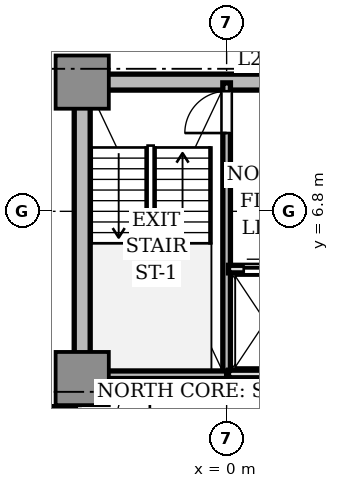
"""IFC4 building model, lengths in metres.
Left out: names, types, materials, properties, quantities, classifications, styles, units other than length and angle.
Written with IfcOpenShell. Run it as: python <this file> out.ifc"""

import sys

from ifc_helpers import new_model, si_unit, direction, frame, frame_2d, origin, origin_2d, place, context, subcontext, project, spatial, rectangle, extrude, source, transform, mapped, element, fill, save


model = new_model("IFC4")
c1 = context("Model", 3, precision=1e-05, world=origin(), true_north=direction((0.0, 1.0)))
c2 = subcontext(c1, "Body", "Model", "MODEL_VIEW")
j1 = project(units=[si_unit("LENGTHUNIT", "METRE"), si_unit("PLANEANGLEUNIT", "RADIAN")], contexts=[c1])
p1 = place(None, origin())
s1 = spatial("IfcSite", under=j1, at=p1, CompositionType="ELEMENT")
p2 = place(p1, origin())
s2 = spatial("IfcBuilding", under=s1, at=p2, CompositionType="ELEMENT")
p3 = place(p2, frame((0.0, 0.0, 93.55)))
s3 = spatial("IfcBuildingStorey", under=s2, at=p3, CompositionType="ELEMENT", Elevation=93.55)
p4 = place(p3, frame((-3.55, 10.2, 0.0), z_axis=(0.0, 0.0, 1.0), x_axis=(1.0, 0.0, 0.0)))
e1 = element("IfcWall", 1, at=p4, inside=s3, PredefinedType="SHEAR", context=c2, shape_type="SweptSolid", body=[
    extrude(rectangle(XDim=7.1, YDim=0.42, at=frame_2d((3.55, 0.0))), origin(), (0.0, 0.0, 1.0), 3.11),
])
p5 = place(p3, frame((-3.8, 2.85, 0.0), z_axis=(0.0, 0.0, 1.0), x_axis=(0.0, 1.0, 0.0)))
e2 = element("IfcWall", 2, at=p5, inside=s3, PredefinedType="SHEAR", context=c2, shape_type="SweptSolid", body=[
    extrude(rectangle(XDim=6.9, YDim=0.42, at=frame_2d((3.45, 0.0))), origin(), (0.0, 0.0, 1.0), 3.11),
])
m1 = source(origin(), c2, "Body", "SweptSolid", [
    extrude(rectangle(XDim=1.4, YDim=1.4, at=origin_2d()), origin(), (0.0, 0.0, 1.0), 3.11),
])
for number, where, z_axis, x_axis in (
    (3, (-3.8, 2.4, 0.0), (0.0, 0.0, 1.0), (1.0, 0.0, 0.0)),
    (4, (-3.8, 10.2, 0.0), (0.0, 0.0, 1.0), (1.0, 0.0, 0.0)),
):
    element("IfcColumn", number, at=place(p3, frame(where, z_axis=z_axis, x_axis=x_axis)), inside=s3, PredefinedType="COLUMN", context=c2, shape_type="MappedRepresentation", body=[
        mapped(m1, transform((0.0, 0.0, 0.0), scale=1.0)),
    ])
p6 = place(p3, frame((0.0, 2.5, 0.0), z_axis=(0.0, 0.0, 1.0), x_axis=(0.0, 1.0, 0.0)))
e5 = element("IfcWall", 5, at=p6, inside=s3, PredefinedType="SOLIDWALL", context=c2, shape_type="SweptSolid", body=[
    extrude(rectangle(XDim=7.68, YDim=0.2, at=frame_2d((3.84, 0.0))), origin(), (0.0, 0.0, 1.0), 3.11),
])
p7 = place(p6, frame((6.36, 0.0, 0.0)))
e6 = element("IfcOpeningElement", 6, at=p7, cuts=e5, PredefinedType="OPENING", context=c2, shape_type="SweptSolid", body=[
    extrude(rectangle(XDim=1.1, YDim=2.15, at=frame_2d((0.55, 1.075))), frame((0.0, 0.11, 0.0), z_axis=(0.0, -1.0, 0.0), x_axis=(1.0, 0.0, 0.0)), (0.0, 0.0, 1.0), 0.22),
])
p8 = place(p3, frame((-3.72, 2.5, 0.0), z_axis=(0.0, 0.0, 1.0), x_axis=(1.0, 0.0, 0.0)))
e7 = element("IfcWall", 7, at=p8, inside=s3, PredefinedType="SOLIDWALL", context=c2, shape_type="SweptSolid", body=[
    extrude(rectangle(XDim=3.72, YDim=0.2, at=frame_2d((1.86, 0.0))), origin(), (0.0, 0.0, 1.0), 3.11),
])
p9 = place(p3, frame((0.05, 2.52, 0.0), z_axis=(0.0, 0.0, 1.0), x_axis=(1.0, 0.0, 0.0)))
e8 = element("IfcWall", 8, at=p9, inside=s3, PredefinedType="SOLIDWALL", context=c2, shape_type="SweptSolid", body=[
    extrude(rectangle(XDim=1.95, YDim=0.2, at=frame_2d((0.975, 0.0))), origin(), (0.0, 0.0, 1.0), 2.66),
])
p10 = place(p3, frame((0.05, 5.28, 0.0), z_axis=(0.0, 0.0, 1.0), x_axis=(1.0, 0.0, 0.0)))
e9 = element("IfcWall", 9, at=p10, inside=s3, PredefinedType="SOLIDWALL", context=c2, shape_type="SweptSolid", body=[
    extrude(rectangle(XDim=1.93, YDim=0.2, at=frame_2d((0.965, 0.0))), origin(), (0.0, 0.0, 1.0), 2.66),
])
p11 = place(p10, frame((0.4, 0.0, 0.0)))
e10 = element("IfcOpeningElement", 10, at=p11, cuts=e9, PredefinedType="OPENING", context=c2, shape_type="SweptSolid", body=[
    extrude(rectangle(XDim=1.1, YDim=2.2, at=frame_2d((0.55, 1.1))), frame((0.0, 0.11, 0.0), z_axis=(0.0, -1.0, 0.0), x_axis=(1.0, 0.0, 0.0)), (0.0, 0.0, 1.0), 0.22),
])
p12 = place(p3, frame((-5.62, 1.56, 0.0), z_axis=(0.0, 0.0, 1.0), x_axis=(1.0, 0.0, 0.0)))
e11 = element("IfcWall", 11, at=p12, inside=s3, PredefinedType="SOLIDWALL", context=c2, shape_type="SweptSolid", body=[
    extrude(rectangle(XDim=1.64, YDim=0.2, at=frame_2d((0.82, 0.0))), origin(), (0.0, 0.0, 1.0), 2.66),
])
m2 = source(origin(), c2, "Body", "SweptSolid", [
    extrude(rectangle(XDim=1.1, YDim=0.05, at=origin_2d()), origin(), (0.0, 0.0, 1.0), 2.15),
])
p13 = place(p7, frame((0.55, 0.0, 0.0)))
e12 = element("IfcDoor", 12, at=p13, inside=s3, OperationType="SINGLE_SWING_LEFT", PredefinedType="DOOR", context=c2, shape_type="MappedRepresentation", body=[
    mapped(m2, transform((0.0, 0.0, 0.0), scale=1.0)),
])
fill(e6, e12)
m3 = source(origin(), c2, "Body", "SweptSolid", [
    extrude(rectangle(XDim=1.1, YDim=0.05, at=origin_2d()), origin(), (0.0, 0.0, 1.0), 2.2),
])
p14 = place(p11, frame((0.55, 0.0, 0.0)))
e13 = element("IfcDoor", 13, at=p14, inside=s3, OperationType="DOUBLE_DOOR_SLIDING", PredefinedType="DOOR", context=c2, shape_type="MappedRepresentation", body=[
    mapped(m3, transform((0.0, 0.0, 0.0), scale=1.0)),
])
fill(e10, e13)
save(model, sys.argv[1])
